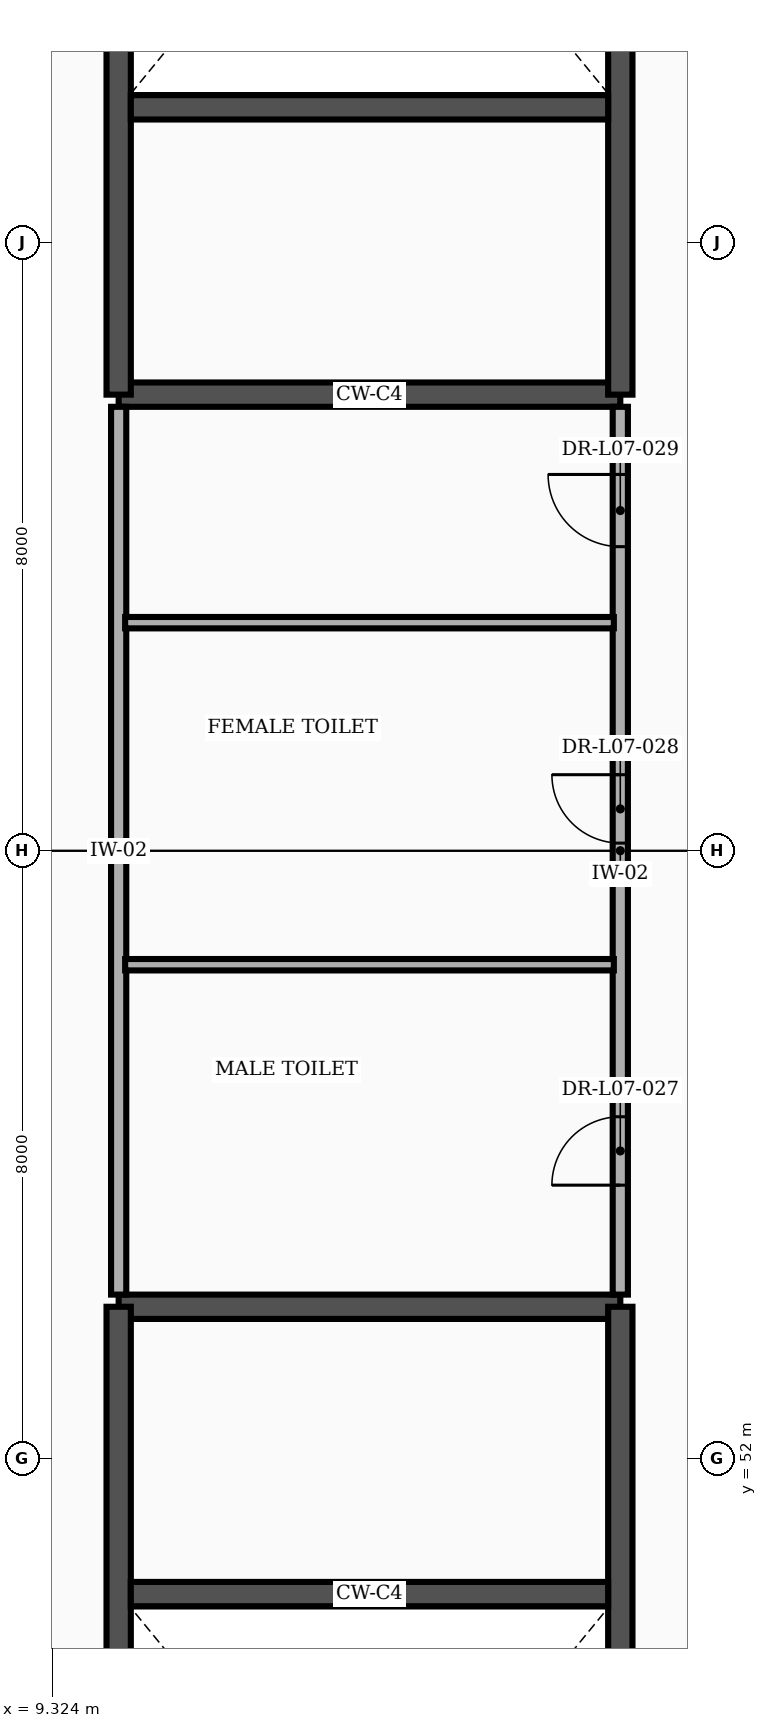
"""IFC4 building model, lengths in metres.
Left out: names, types, materials, properties, quantities, classifications, styles, units other than length and angle.
Written with IfcOpenShell. Run it as: python <this file> out.ifc"""

import sys

from ifc_helpers import new_model, si_unit, direction, frame, frame_2d, origin, place, context, subcontext, project, spatial, rectangle, extrude, element, fill, save


model = new_model("IFC4")
c1 = context("Model", 3, precision=1e-05, world=origin(), true_north=direction((0.0, 1.0)))
c2 = subcontext(c1, "Body", "Model", "MODEL_VIEW")
j1 = project(units=[si_unit("LENGTHUNIT", "METRE"), si_unit("PLANEANGLEUNIT", "RADIAN")], contexts=[c1])
p1 = place(None, origin())
s1 = spatial("IfcSite", under=j1, at=p1, CompositionType="ELEMENT")
p2 = place(p1, origin())
s2 = spatial("IfcBuilding", under=s1, at=p2, CompositionType="ELEMENT")
p3 = place(p2, frame((0.0, 0.0, 33.3)))
s3 = spatial("IfcBuildingStorey", under=s2, at=p3, CompositionType="ELEMENT", Elevation=33.3)
p4 = place(p3, frame((10.2, 54.0, 0.0), z_axis=(0.0, 0.0, 1.0), x_axis=(1.0, 0.0, 0.0)))
e1 = element("IfcWall", 1, at=p4, inside=s3, PredefinedType="SHEAR", context=c2, shape_type="SweptSolid", body=[
    extrude(rectangle(XDim=6.6, YDim=0.32, at=frame_2d((3.3, 0.0))), origin(), (0.0, 0.0, 1.0), 4.255),
])
p5 = place(p3, frame((10.2, 39.4, 0.0), z_axis=(0.0, 0.0, 1.0), x_axis=(0.0, 1.0, 0.0)))
e2 = element("IfcWall", 2, at=p5, inside=s3, PredefinedType="SHEAR", context=c2, shape_type="SweptSolid", body=[
    extrude(rectangle(XDim=14.6, YDim=0.32, at=frame_2d((7.3, 0.0))), origin(), (0.0, 0.0, 1.0), 4.255),
])
p6 = place(p3, frame((16.8, 39.4, 0.0), z_axis=(0.0, 0.0, 1.0), x_axis=(0.0, 1.0, 0.0)))
e3 = element("IfcWall", 3, at=p6, inside=s3, PredefinedType="SHEAR", context=c2, shape_type="SweptSolid", body=[
    extrude(rectangle(XDim=14.6, YDim=0.32, at=frame_2d((7.3, 0.0))), origin(), (0.0, 0.0, 1.0), 4.255),
])
p7 = place(p6, frame((0.55, 0.0, 0.0)))
e4 = element("IfcOpeningElement", 4, at=p7, cuts=e3, PredefinedType="OPENING", context=c2, shape_type="SweptSolid", body=[
    extrude(rectangle(XDim=2.4, YDim=2.25, at=frame_2d((1.2, 1.125))), frame((0.0, 0.172, 0.0), z_axis=(0.0, -1.0, 0.0), x_axis=(1.0, 0.0, 0.0)), (0.0, 0.0, 1.0), 0.344),
])
p8 = place(p3, frame((10.36, 50.22, 0.0), z_axis=(0.0, 0.0, 1.0), x_axis=(1.0, 0.0, 0.0)))
e5 = element("IfcWall", 5, at=p8, inside=s3, PredefinedType="SHEAR", context=c2, shape_type="SweptSolid", body=[
    extrude(rectangle(XDim=6.28, YDim=0.32, at=frame_2d((3.14, 0.0))), origin(), (0.0, 0.0, 1.0), 4.255),
])
p9 = place(p3, frame((10.2, 66.0, 0.0), z_axis=(0.0, 0.0, 1.0), x_axis=(1.0, 0.0, 0.0)))
e6 = element("IfcWall", 6, at=p9, inside=s3, PredefinedType="SHEAR", context=c2, shape_type="SweptSolid", body=[
    extrude(rectangle(XDim=6.6, YDim=0.32, at=frame_2d((3.3, 0.0))), origin(), (0.0, 0.0, 1.0), 4.255),
])
p10 = place(p3, frame((10.2, 66.0, 0.0), z_axis=(0.0, 0.0, 1.0), x_axis=(0.0, 1.0, 0.0)))
e7 = element("IfcWall", 7, at=p10, inside=s3, PredefinedType="SHEAR", context=c2, shape_type="SweptSolid", body=[
    extrude(rectangle(XDim=14.6, YDim=0.32, at=frame_2d((7.3, 0.0))), origin(), (0.0, 0.0, 1.0), 4.255),
])
p11 = place(p3, frame((16.8, 66.0, 0.0), z_axis=(0.0, 0.0, 1.0), x_axis=(0.0, 1.0, 0.0)))
e8 = element("IfcWall", 8, at=p11, inside=s3, PredefinedType="SHEAR", context=c2, shape_type="SweptSolid", body=[
    extrude(rectangle(XDim=14.6, YDim=0.32, at=frame_2d((7.3, 0.0))), origin(), (0.0, 0.0, 1.0), 4.255),
])
p12 = place(p11, frame((11.65, 0.0, 0.0)))
e9 = element("IfcOpeningElement", 9, at=p12, cuts=e8, PredefinedType="OPENING", context=c2, shape_type="SweptSolid", body=[
    extrude(rectangle(XDim=2.4, YDim=2.25, at=frame_2d((1.2, 1.125))), frame((0.0, 0.172, 0.0), z_axis=(0.0, -1.0, 0.0), x_axis=(1.0, 0.0, 0.0)), (0.0, 0.0, 1.0), 0.344),
])
p13 = place(p3, frame((10.36, 69.78, 0.0), z_axis=(0.0, 0.0, 1.0), x_axis=(1.0, 0.0, 0.0)))
e10 = element("IfcWall", 10, at=p13, inside=s3, PredefinedType="SHEAR", context=c2, shape_type="SweptSolid", body=[
    extrude(rectangle(XDim=6.28, YDim=0.32, at=frame_2d((3.14, 0.0))), origin(), (0.0, 0.0, 1.0), 4.255),
])
p14 = place(p3, frame((10.2, 54.16, 0.0), z_axis=(0.0, 0.0, 1.0), x_axis=(0.0, 1.0, 0.0)))
e11 = element("IfcWall", 11, at=p14, inside=s3, PredefinedType="PARTITIONING", context=c2, shape_type="SweptSolid", body=[
    extrude(rectangle(XDim=11.68, YDim=0.2, at=frame_2d((5.84, 0.0))), origin(), (0.0, 0.0, 1.0), 4.255),
])
p15 = place(p3, frame((16.8, 54.16, 0.0), z_axis=(0.0, 0.0, 1.0), x_axis=(0.0, 1.0, 0.0)))
e12 = element("IfcWall", 12, at=p15, inside=s3, PredefinedType="PARTITIONING", context=c2, shape_type="SweptSolid", body=[
    extrude(rectangle(XDim=11.68, YDim=0.2, at=frame_2d((5.84, 0.0))), origin(), (0.0, 0.0, 1.0), 4.255),
])
p16 = place(p15, frame((1.44, 0.0, 0.0)))
e13 = element("IfcOpeningElement", 13, at=p16, cuts=e12, PredefinedType="OPENING", context=c2, shape_type="SweptSolid", body=[
    extrude(rectangle(XDim=0.9, YDim=2.1, at=frame_2d((0.45, 1.05))), frame((0.0, 0.112, 0.0), z_axis=(0.0, -1.0, 0.0), x_axis=(1.0, 0.0, 0.0)), (0.0, 0.0, 1.0), 0.224),
])
p17 = place(p15, frame((5.94, 0.0, 0.0)))
e14 = element("IfcOpeningElement", 14, at=p17, cuts=e12, PredefinedType="OPENING", context=c2, shape_type="SweptSolid", body=[
    extrude(rectangle(XDim=0.9, YDim=2.1, at=frame_2d((0.45, 1.05))), frame((0.0, 0.112, 0.0), z_axis=(0.0, -1.0, 0.0), x_axis=(1.0, 0.0, 0.0)), (0.0, 0.0, 1.0), 0.224),
])
p18 = place(p15, frame((9.84, 0.0, 0.0)))
e15 = element("IfcOpeningElement", 15, at=p18, cuts=e12, PredefinedType="OPENING", context=c2, shape_type="SweptSolid", body=[
    extrude(rectangle(XDim=0.95, YDim=2.1, at=frame_2d((0.475, 1.05))), frame((0.0, 0.112, 0.0), z_axis=(0.0, -1.0, 0.0), x_axis=(1.0, 0.0, 0.0)), (0.0, 0.0, 1.0), 0.224),
])
for number, where, z_axis, x_axis in (
    (16, (10.285, 58.5, 0.0), (0.0, 0.0, 1.0), (1.0, 0.0, 0.0)),
    (17, (10.285, 63.0, 0.0), (0.0, 0.0, 1.0), (1.0, 0.0, 0.0)),
):
    element("IfcWall", number, at=place(p3, frame(where, z_axis=z_axis, x_axis=x_axis)), inside=s3, PredefinedType="PARTITIONING", context=c2, shape_type="SweptSolid", body=[
        extrude(rectangle(XDim=6.43, YDim=0.15, at=frame_2d((3.215, 0.0))), origin(), (0.0, 0.0, 1.0), 4.255),
    ])
p19 = place(p16, origin())
e18 = element("IfcDoor", 18, at=p19, inside=s3, OperationType="SINGLE_SWING_LEFT", PredefinedType="DOOR", context=c2, shape_type="SweptSolid", body=[
    extrude(rectangle(XDim=0.9, YDim=2.1, at=frame_2d((0.45, 1.05))), frame((0.0, 0.025, 0.0), z_axis=(0.0, -1.0, 0.0), x_axis=(1.0, 0.0, 0.0)), (0.0, 0.0, 1.0), 0.05),
])
fill(e13, e18)
p20 = place(p17, origin())
e19 = element("IfcDoor", 19, at=p20, inside=s3, OperationType="SINGLE_SWING_RIGHT", PredefinedType="DOOR", context=c2, shape_type="SweptSolid", body=[
    extrude(rectangle(XDim=0.9, YDim=2.1, at=frame_2d((0.45, 1.05))), frame((0.0, 0.025, 0.0), z_axis=(0.0, -1.0, 0.0), x_axis=(1.0, 0.0, 0.0)), (0.0, 0.0, 1.0), 0.05),
])
fill(e14, e19)
p21 = place(p18, origin())
e20 = element("IfcDoor", 20, at=p21, inside=s3, OperationType="SINGLE_SWING_RIGHT", PredefinedType="DOOR", context=c2, shape_type="SweptSolid", body=[
    extrude(rectangle(XDim=0.95, YDim=2.1, at=frame_2d((0.475, 1.05))), frame((0.0, 0.025, 0.0), z_axis=(0.0, -1.0, 0.0), x_axis=(1.0, 0.0, 0.0)), (0.0, 0.0, 1.0), 0.05),
])
fill(e15, e20)
save(model, sys.argv[1])
